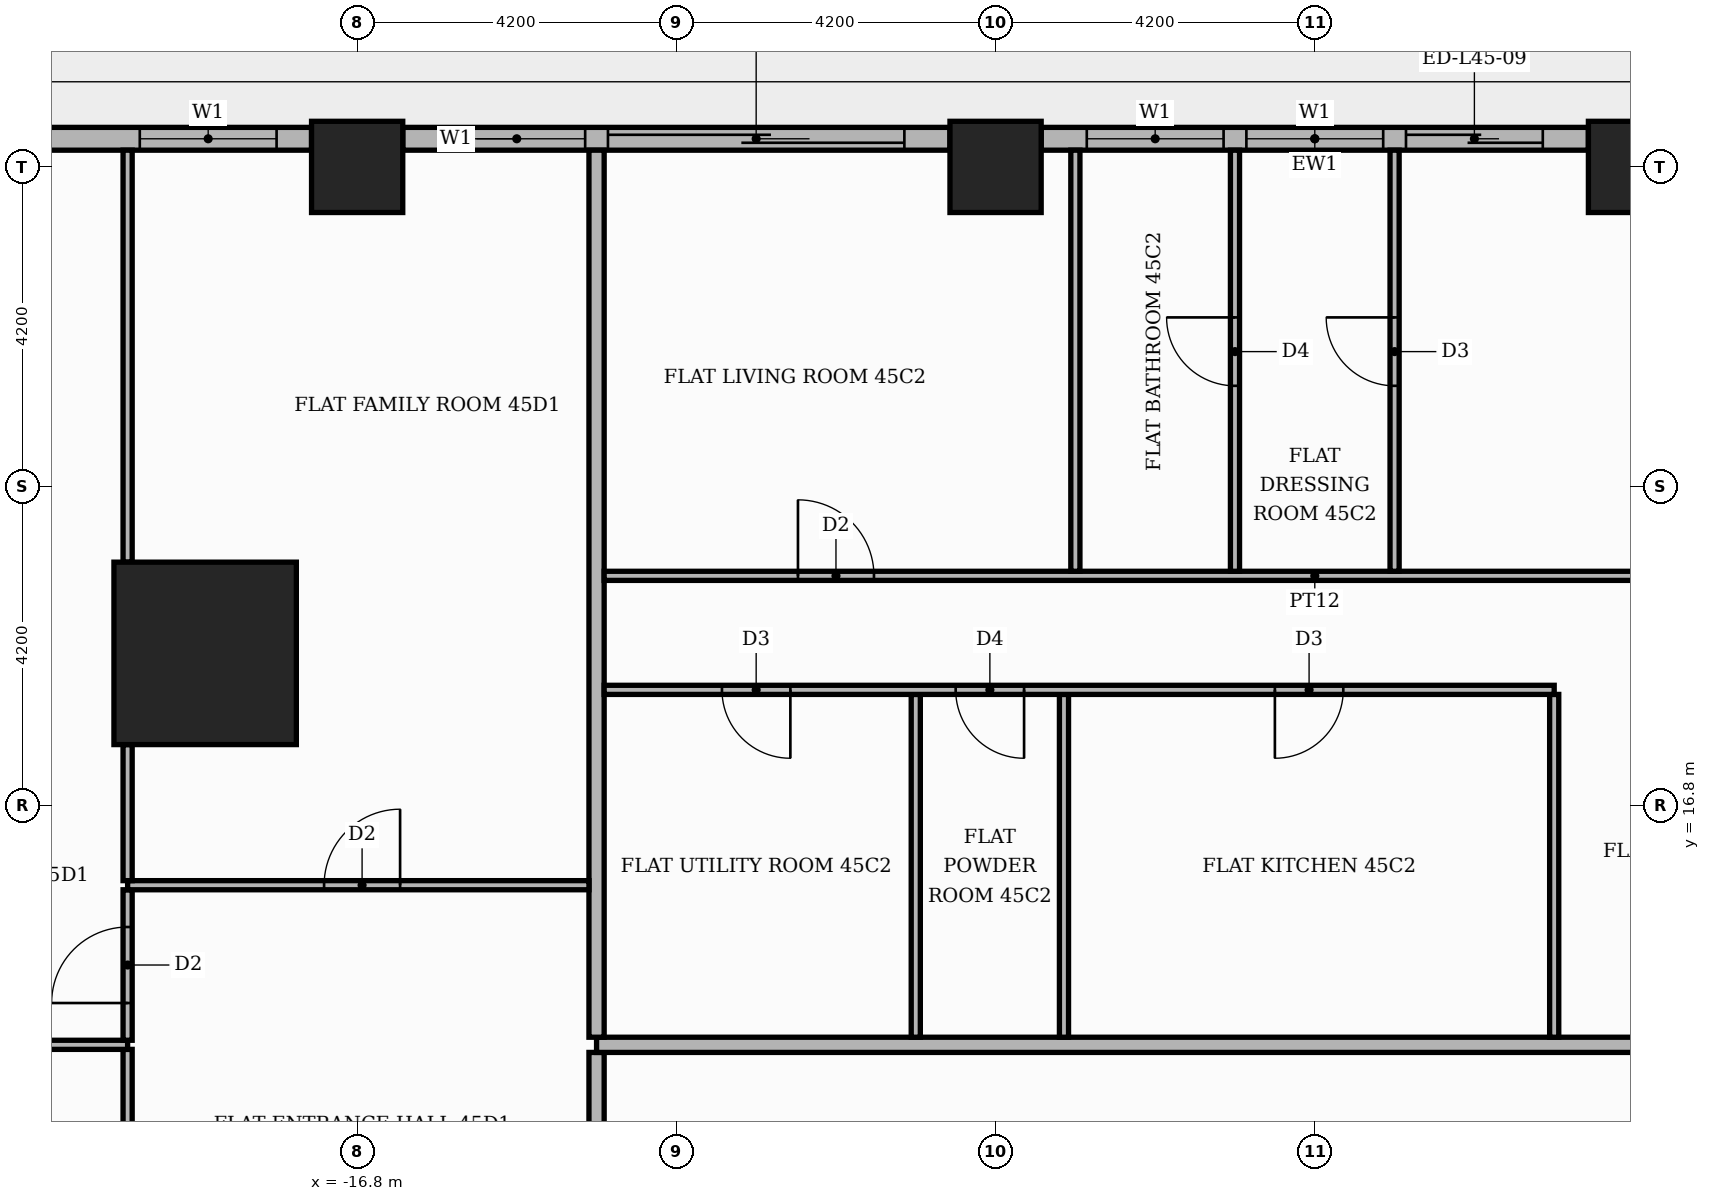
"""IFC4 building model, lengths in metres.
Left out: names, types, materials, properties, quantities, classifications, styles, units other than length and angle.
Written with IfcOpenShell. Run it as: python <this file> out.ifc"""

import sys

from ifc_helpers import new_model, si_unit, direction, frame, frame_2d, origin, origin_2d, place, context, subcontext, project, spatial, rectangle, extrude, element, fill, save


model = new_model("IFC4")
c1 = context("Model", 3, precision=1e-05, world=origin(), true_north=direction((0.0, 1.0)))
c2 = subcontext(c1, "Body", "Model", "MODEL_VIEW")
j1 = project(units=[si_unit("LENGTHUNIT", "METRE"), si_unit("PLANEANGLEUNIT", "RADIAN")], contexts=[c1])
p1 = place(None, origin())
s1 = spatial("IfcSite", under=j1, at=p1, CompositionType="ELEMENT")
p2 = place(p1, origin())
s2 = spatial("IfcBuilding", under=s1, at=p2, CompositionType="ELEMENT")
p3 = place(p2, frame((0.0, 0.0, 192.3)))
s3 = spatial("IfcBuildingStorey", under=s2, at=p3, CompositionType="ELEMENT", Elevation=192.3)
p4 = place(p3, frame((-18.8, 18.8, 0.0), z_axis=(0.0, 0.0, 1.0), x_axis=(1.0, 0.0, 0.0)))
e1 = element("IfcColumn", 1, at=p4, inside=s3, PredefinedType="COLUMN", context=c2, shape_type="SweptSolid", body=[
    extrude(rectangle(XDim=2.4, YDim=2.4, at=origin_2d()), origin(), (0.0, 0.0, 1.0), 3.9),
])
for number, where, z_axis, x_axis in (
    (2, (0.0, 25.2, 0.0), (0.0, 0.0, 1.0), (1.0, 0.0, 0.0)),
    (3, (-8.4, 25.2, 0.0), (0.0, 0.0, 1.0), (1.0, 0.0, 0.0)),
    (4, (-16.8, 25.2, 0.0), (0.0, 0.0, 1.0), (1.0, 0.0, 0.0)),
):
    element("IfcColumn", number, at=place(p3, frame(where, z_axis=z_axis, x_axis=x_axis)), inside=s3, PredefinedType="COLUMN", context=c2, shape_type="SweptSolid", body=[
        extrude(rectangle(XDim=1.2, YDim=1.2, at=origin_2d()), origin(), (0.0, 0.0, 1.0), 3.9),
    ])
p5 = place(p3, frame((-0.6, 25.57, 0.0), z_axis=(0.0, 0.0, 1.0), x_axis=(-1.0, 0.0, 0.0)))
e5 = element("IfcWall", 5, at=p5, inside=s3, PredefinedType="STANDARD", context=c2, shape_type="SweptSolid", body=[
    extrude(rectangle(XDim=7.2, YDim=0.3, at=frame_2d((3.6, 0.0))), origin(), (0.0, 0.0, 1.0), 3.48),
])
p6 = place(p5, frame((0.6, 0.0, 0.0)))
e6 = element("IfcOpeningElement", 6, at=p6, cuts=e5, PredefinedType="OPENING", context=c2, shape_type="SweptSolid", body=[
    extrude(rectangle(XDim=1.8, YDim=2.4, at=frame_2d((0.9, 1.2))), frame((0.0, 0.16, 0.0), z_axis=(0.0, -1.0, 0.0), x_axis=(1.0, 0.0, 0.0)), (0.0, 0.0, 1.0), 0.32),
])
p7 = place(p5, frame((2.7, 0.0, 0.9)))
e7 = element("IfcOpeningElement", 7, at=p7, cuts=e5, PredefinedType="OPENING", context=c2, shape_type="SweptSolid", body=[
    extrude(rectangle(XDim=1.8, YDim=2.1, at=frame_2d((0.9, 1.05))), frame((0.0, 0.16, 0.0), z_axis=(0.0, -1.0, 0.0), x_axis=(1.0, 0.0, 0.0)), (0.0, 0.0, 1.0), 0.32),
])
p8 = place(p5, frame((4.8, 0.0, 0.9)))
e8 = element("IfcOpeningElement", 8, at=p8, cuts=e5, PredefinedType="OPENING", context=c2, shape_type="SweptSolid", body=[
    extrude(rectangle(XDim=1.8, YDim=2.1, at=frame_2d((0.9, 1.05))), frame((0.0, 0.16, 0.0), z_axis=(0.0, -1.0, 0.0), x_axis=(1.0, 0.0, 0.0)), (0.0, 0.0, 1.0), 0.32),
])
p9 = place(p3, frame((-9.0, 25.57, 0.0), z_axis=(0.0, 0.0, 1.0), x_axis=(-1.0, 0.0, 0.0)))
e9 = element("IfcWall", 9, at=p9, inside=s3, PredefinedType="STANDARD", context=c2, shape_type="SweptSolid", body=[
    extrude(rectangle(XDim=7.2, YDim=0.3, at=frame_2d((3.6, 0.0))), origin(), (0.0, 0.0, 1.0), 3.48),
])
p10 = place(p9, frame((0.6, 0.0, 0.0)))
e10 = element("IfcOpeningElement", 10, at=p10, cuts=e9, PredefinedType="OPENING", context=c2, shape_type="SweptSolid", body=[
    extrude(rectangle(XDim=3.9, YDim=2.4, at=frame_2d((1.95, 1.2))), frame((0.0, 0.16, 0.0), z_axis=(0.0, -1.0, 0.0), x_axis=(1.0, 0.0, 0.0)), (0.0, 0.0, 1.0), 0.32),
])
p11 = place(p9, frame((4.8, 0.0, 0.9)))
e11 = element("IfcOpeningElement", 11, at=p11, cuts=e9, PredefinedType="OPENING", context=c2, shape_type="SweptSolid", body=[
    extrude(rectangle(XDim=1.8, YDim=2.1, at=frame_2d((0.9, 1.05))), frame((0.0, 0.16, 0.0), z_axis=(0.0, -1.0, 0.0), x_axis=(1.0, 0.0, 0.0)), (0.0, 0.0, 1.0), 0.32),
])
p12 = place(p3, frame((-17.4, 25.57, 0.0), z_axis=(0.0, 0.0, 1.0), x_axis=(-1.0, 0.0, 0.0)))
e12 = element("IfcWall", 12, at=p12, inside=s3, PredefinedType="STANDARD", context=c2, shape_type="SweptSolid", body=[
    extrude(rectangle(XDim=3.82, YDim=0.3, at=frame_2d((1.91, 0.0))), origin(), (0.0, 0.0, 1.0), 3.48),
])
p13 = place(p12, frame((0.46, 0.0, 0.9)))
e13 = element("IfcOpeningElement", 13, at=p13, cuts=e12, PredefinedType="OPENING", context=c2, shape_type="SweptSolid", body=[
    extrude(rectangle(XDim=1.8, YDim=2.1, at=frame_2d((0.9, 1.05))), frame((0.0, 0.16, 0.0), z_axis=(0.0, -1.0, 0.0), x_axis=(1.0, 0.0, 0.0)), (0.0, 0.0, 1.0), 0.32),
])
p14 = place(p3, frame((-13.65, 5.35, 0.0), z_axis=(0.0, 0.0, 1.0), x_axis=(0.0, 1.0, 0.0)))
e14 = element("IfcWall", 14, at=p14, inside=s3, PredefinedType="PARTITIONING", context=c2, shape_type="SweptSolid", body=[
    extrude(rectangle(XDim=8.2, YDim=0.2, at=frame_2d((4.1, 0.0))), origin(), (0.0, 0.0, 1.0), 3.48),
])
p15 = place(p14, frame((5.65, 0.0, 0.0)))
e15 = element("IfcOpeningElement", 15, at=p15, cuts=e14, PredefinedType="OPENING", context=c2, shape_type="SweptSolid", body=[
    extrude(rectangle(XDim=1.1, YDim=2.4, at=frame_2d((0.55, 1.2))), frame((0.0, 0.11, 0.0), z_axis=(0.0, -1.0, 0.0), x_axis=(1.0, 0.0, 0.0)), (0.0, 0.0, 1.0), 0.22),
])
p16 = place(p3, frame((-19.82, 9.51, 0.0), z_axis=(0.0, 0.0, 1.0), x_axis=(0.0, 1.0, 0.0)))
e16 = element("IfcWall", 16, at=p16, inside=s3, PredefinedType="PARTITIONING", context=c2, shape_type="SweptSolid", body=[
    extrude(rectangle(XDim=4.08, YDim=0.12, at=frame_2d((2.04, 0.0))), origin(), (0.0, 0.0, 1.0), 3.48),
])
p17 = place(p16, frame((1.59, 0.0, 0.0)))
e17 = element("IfcOpeningElement", 17, at=p17, cuts=e16, PredefinedType="OPENING", context=c2, shape_type="SweptSolid", body=[
    extrude(rectangle(XDim=0.9, YDim=2.1, at=frame_2d((0.45, 1.05))), frame((0.0, 0.07, 0.0), z_axis=(0.0, -1.0, 0.0), x_axis=(1.0, 0.0, 0.0)), (0.0, 0.0, 1.0), 0.14),
])
p18 = place(p3, frame((-25.42, 13.65, 0.0), z_axis=(0.0, 0.0, 1.0), x_axis=(1.0, 0.0, 0.0)))
e18 = element("IfcWall", 18, at=p18, inside=s3, PredefinedType="PARTITIONING", context=c2, shape_type="SweptSolid", body=[
    extrude(rectangle(XDim=5.6, YDim=0.12, at=frame_2d((2.8, 0.0))), origin(), (0.0, 0.0, 1.0), 3.48),
])
p19 = place(p3, frame((-13.65, 13.65, 0.0), z_axis=(0.0, 0.0, 1.0), x_axis=(1.0, 0.0, 0.0)))
e19 = element("IfcWall", 19, at=p19, inside=s3, PredefinedType="PARTITIONING", context=c2, shape_type="SweptSolid", body=[
    extrude(rectangle(XDim=39.07, YDim=0.2, at=frame_2d((19.535, 0.0))), origin(), (0.0, 0.0, 1.0), 3.48),
])
p20 = place(p19, frame((24.65, 0.0, 0.0)))
e20 = element("IfcOpeningElement", 20, at=p20, cuts=e19, PredefinedType="OPENING", context=c2, shape_type="SweptSolid", body=[
    extrude(rectangle(XDim=1.1, YDim=2.4, at=frame_2d((0.55, 1.2))), frame((0.0, 0.11, 0.0), z_axis=(0.0, -1.0, 0.0), x_axis=(1.0, 0.0, 0.0)), (0.0, 0.0, 1.0), 0.22),
])
p21 = place(p19, frame((14.15, 0.0, 0.0)))
e21 = element("IfcOpeningElement", 21, at=p21, cuts=e19, PredefinedType="OPENING", context=c2, shape_type="SweptSolid", body=[
    extrude(rectangle(XDim=1.1, YDim=2.4, at=frame_2d((0.55, 1.2))), frame((0.0, 0.11, 0.0), z_axis=(0.0, -1.0, 0.0), x_axis=(1.0, 0.0, 0.0)), (0.0, 0.0, 1.0), 0.22),
])
p22 = place(p3, frame((-19.82, 13.71, 0.0), z_axis=(0.0, 0.0, 1.0), x_axis=(0.0, 1.0, 0.0)))
e22 = element("IfcWall", 22, at=p22, inside=s3, PredefinedType="PARTITIONING", context=c2, shape_type="SweptSolid", body=[
    extrude(rectangle(XDim=1.98, YDim=0.12, at=frame_2d((0.99, 0.0))), origin(), (0.0, 0.0, 1.0), 3.48),
])
p23 = place(p22, frame((0.49, 0.0, 0.0)))
e23 = element("IfcOpeningElement", 23, at=p23, cuts=e22, PredefinedType="OPENING", context=c2, shape_type="SweptSolid", body=[
    extrude(rectangle(XDim=1.0, YDim=2.1, at=frame_2d((0.5, 1.05))), frame((0.0, 0.07, 0.0), z_axis=(0.0, -1.0, 0.0), x_axis=(1.0, 0.0, 0.0)), (0.0, 0.0, 1.0), 0.14),
])
p24 = place(p3, frame((-13.65, 13.75, 0.0), z_axis=(0.0, 0.0, 1.0), x_axis=(0.0, 1.0, 0.0)))
e24 = element("IfcWall", 24, at=p24, inside=s3, PredefinedType="PARTITIONING", context=c2, shape_type="SweptSolid", body=[
    extrude(rectangle(XDim=11.67, YDim=0.2, at=frame_2d((5.835, 0.0))), origin(), (0.0, 0.0, 1.0), 3.48),
])
for number, where, z_axis, x_axis in (
    (25, (-9.45, 13.75, 0.0), (0.0, 0.0, 1.0), (0.0, 1.0, 0.0)),
    (26, (-7.5, 13.75, 0.0), (0.0, 0.0, 1.0), (0.0, 1.0, 0.0)),
    (27, (-1.05, 13.75, 0.0), (0.0, 0.0, 1.0), (0.0, 1.0, 0.0)),
):
    element("IfcWall", number, at=place(p3, frame(where, z_axis=z_axis, x_axis=x_axis)), inside=s3, PredefinedType="PARTITIONING", context=c2, shape_type="SweptSolid", body=[
        extrude(rectangle(XDim=4.51, YDim=0.12, at=frame_2d((2.255, 0.0))), origin(), (0.0, 0.0, 1.0), 3.48),
    ])
p25 = place(p3, frame((-19.82, 15.75, 0.0), z_axis=(0.0, 0.0, 1.0), x_axis=(1.0, 0.0, 0.0)))
e28 = element("IfcWall", 28, at=p25, inside=s3, PredefinedType="PARTITIONING", context=c2, shape_type="SweptSolid", body=[
    extrude(rectangle(XDim=6.07, YDim=0.12, at=frame_2d((3.035, 0.0))), origin(), (0.0, 0.0, 1.0), 3.48),
])
p26 = place(p25, frame((2.585, 0.0, 0.0)))
e29 = element("IfcOpeningElement", 29, at=p26, cuts=e28, PredefinedType="OPENING", context=c2, shape_type="SweptSolid", body=[
    extrude(rectangle(XDim=1.0, YDim=2.1, at=frame_2d((0.5, 1.05))), frame((0.0, 0.07, 0.0), z_axis=(0.0, -1.0, 0.0), x_axis=(1.0, 0.0, 0.0)), (0.0, 0.0, 1.0), 0.14),
])
p27 = place(p3, frame((-19.82, 15.81, 0.0), z_axis=(0.0, 0.0, 1.0), x_axis=(0.0, 1.0, 0.0)))
e30 = element("IfcWall", 30, at=p27, inside=s3, PredefinedType="PARTITIONING", context=c2, shape_type="SweptSolid", body=[
    extrude(rectangle(XDim=1.79, YDim=0.12, at=frame_2d((0.895, 0.0))), origin(), (0.0, 0.0, 1.0), 3.48),
])
p28 = place(p3, frame((-13.55, 18.32, 0.0), z_axis=(0.0, 0.0, 1.0), x_axis=(1.0, 0.0, 0.0)))
e31 = element("IfcWall", 31, at=p28, inside=s3, PredefinedType="PARTITIONING", context=c2, shape_type="SweptSolid", body=[
    extrude(rectangle(XDim=12.5, YDim=0.12, at=frame_2d((6.25, 0.0))), origin(), (0.0, 0.0, 1.0), 3.48),
])
p29 = place(p28, frame((8.825, 0.0, 0.0)))
e32 = element("IfcOpeningElement", 32, at=p29, cuts=e31, PredefinedType="OPENING", context=c2, shape_type="SweptSolid", body=[
    extrude(rectangle(XDim=0.9, YDim=2.1, at=frame_2d((0.45, 1.05))), frame((0.0, 0.07, 0.0), z_axis=(0.0, -1.0, 0.0), x_axis=(1.0, 0.0, 0.0)), (0.0, 0.0, 1.0), 0.14),
])
p30 = place(p28, frame((4.625, 0.0, 0.0)))
e33 = element("IfcOpeningElement", 33, at=p30, cuts=e31, PredefinedType="OPENING", context=c2, shape_type="SweptSolid", body=[
    extrude(rectangle(XDim=0.9, YDim=2.1, at=frame_2d((0.45, 1.05))), frame((0.0, 0.07, 0.0), z_axis=(0.0, -1.0, 0.0), x_axis=(1.0, 0.0, 0.0)), (0.0, 0.0, 1.0), 0.14),
])
p31 = place(p28, frame((1.55, 0.0, 0.0)))
e34 = element("IfcOpeningElement", 34, at=p31, cuts=e31, PredefinedType="OPENING", context=c2, shape_type="SweptSolid", body=[
    extrude(rectangle(XDim=0.9, YDim=2.1, at=frame_2d((0.45, 1.05))), frame((0.0, 0.07, 0.0), z_axis=(0.0, -1.0, 0.0), x_axis=(1.0, 0.0, 0.0)), (0.0, 0.0, 1.0), 0.14),
])
p32 = place(p3, frame((-13.55, 19.82, 0.0), z_axis=(0.0, 0.0, 1.0), x_axis=(1.0, 0.0, 0.0)))
e35 = element("IfcWall", 35, at=p32, inside=s3, PredefinedType="PARTITIONING", context=c2, shape_type="SweptSolid", body=[
    extrude(rectangle(XDim=18.7, YDim=0.12, at=frame_2d((9.35, 0.0))), origin(), (0.0, 0.0, 1.0), 3.48),
])
p33 = place(p32, frame((14.15, 0.0, 0.0)))
e36 = element("IfcOpeningElement", 36, at=p33, cuts=e35, PredefinedType="OPENING", context=c2, shape_type="SweptSolid", body=[
    extrude(rectangle(XDim=0.9, YDim=2.1, at=frame_2d((0.45, 1.05))), frame((0.0, 0.07, 0.0), z_axis=(0.0, -1.0, 0.0), x_axis=(1.0, 0.0, 0.0)), (0.0, 0.0, 1.0), 0.14),
])
p34 = place(p32, frame((2.55, 0.0, 0.0)))
e37 = element("IfcOpeningElement", 37, at=p34, cuts=e35, PredefinedType="OPENING", context=c2, shape_type="SweptSolid", body=[
    extrude(rectangle(XDim=1.0, YDim=2.1, at=frame_2d((0.5, 1.05))), frame((0.0, 0.07, 0.0), z_axis=(0.0, -1.0, 0.0), x_axis=(1.0, 0.0, 0.0)), (0.0, 0.0, 1.0), 0.14),
])
p35 = place(p3, frame((-7.35, 19.88, 0.0), z_axis=(0.0, 0.0, 1.0), x_axis=(0.0, 1.0, 0.0)))
e38 = element("IfcWall", 38, at=p35, inside=s3, PredefinedType="PARTITIONING", context=c2, shape_type="SweptSolid", body=[
    extrude(rectangle(XDim=5.54, YDim=0.12, at=frame_2d((2.77, 0.0))), origin(), (0.0, 0.0, 1.0), 3.48),
])
p36 = place(p3, frame((-5.25, 19.88, 0.0), z_axis=(0.0, 0.0, 1.0), x_axis=(0.0, 1.0, 0.0)))
e39 = element("IfcWall", 39, at=p36, inside=s3, PredefinedType="PARTITIONING", context=c2, shape_type="SweptSolid", body=[
    extrude(rectangle(XDim=5.54, YDim=0.12, at=frame_2d((2.77, 0.0))), origin(), (0.0, 0.0, 1.0), 3.48),
])
p37 = place(p36, frame((2.44, 0.0, 0.0)))
e40 = element("IfcOpeningElement", 40, at=p37, cuts=e39, PredefinedType="OPENING", context=c2, shape_type="SweptSolid", body=[
    extrude(rectangle(XDim=0.9, YDim=2.1, at=frame_2d((0.45, 1.05))), frame((0.0, 0.07, 0.0), z_axis=(0.0, -1.0, 0.0), x_axis=(1.0, 0.0, 0.0)), (0.0, 0.0, 1.0), 0.14),
])
p38 = place(p3, frame((-3.15, 19.88, 0.0), z_axis=(0.0, 0.0, 1.0), x_axis=(0.0, 1.0, 0.0)))
e41 = element("IfcWall", 41, at=p38, inside=s3, PredefinedType="PARTITIONING", context=c2, shape_type="SweptSolid", body=[
    extrude(rectangle(XDim=5.54, YDim=0.12, at=frame_2d((2.77, 0.0))), origin(), (0.0, 0.0, 1.0), 3.48),
])
p39 = place(p38, frame((2.44, 0.0, 0.0)))
e42 = element("IfcOpeningElement", 42, at=p39, cuts=e41, PredefinedType="OPENING", context=c2, shape_type="SweptSolid", body=[
    extrude(rectangle(XDim=0.9, YDim=2.1, at=frame_2d((0.45, 1.05))), frame((0.0, 0.07, 0.0), z_axis=(0.0, -1.0, 0.0), x_axis=(1.0, 0.0, 0.0)), (0.0, 0.0, 1.0), 0.14),
])
p40 = place(p3, frame((-19.82, 20.0, 0.0), z_axis=(0.0, 0.0, 1.0), x_axis=(0.0, 1.0, 0.0)))
e43 = element("IfcWall", 43, at=p40, inside=s3, PredefinedType="PARTITIONING", context=c2, shape_type="SweptSolid", body=[
    extrude(rectangle(XDim=5.42, YDim=0.12, at=frame_2d((2.71, 0.0))), origin(), (0.0, 0.0, 1.0), 3.48),
])
p41 = place(p6, origin())
e44 = element("IfcDoor", 44, at=p41, inside=s3, OperationType="SLIDING_TO_LEFT", PredefinedType="DOOR", context=c2, shape_type="SweptSolid", body=[
    extrude(rectangle(XDim=1.8, YDim=2.4, at=frame_2d((0.9, 1.2))), frame((0.0, 0.025, 0.0), z_axis=(0.0, -1.0, 0.0), x_axis=(1.0, 0.0, 0.0)), (0.0, 0.0, 1.0), 0.05),
])
fill(e6, e44)
p42 = place(p7, origin())
e45 = element("IfcWindow", 45, at=p42, inside=s3, PartitioningType="SINGLE_PANEL", PredefinedType="WINDOW", context=c2, shape_type="SweptSolid", body=[
    extrude(rectangle(XDim=1.8, YDim=2.1, at=frame_2d((0.9, 1.05))), frame((0.0, 0.03, 0.0), z_axis=(0.0, -1.0, 0.0), x_axis=(1.0, 0.0, 0.0)), (0.0, 0.0, 1.0), 0.06),
])
fill(e7, e45)
p43 = place(p8, origin())
e46 = element("IfcWindow", 46, at=p43, inside=s3, PartitioningType="SINGLE_PANEL", PredefinedType="WINDOW", context=c2, shape_type="SweptSolid", body=[
    extrude(rectangle(XDim=1.8, YDim=2.1, at=frame_2d((0.9, 1.05))), frame((0.0, 0.03, 0.0), z_axis=(0.0, -1.0, 0.0), x_axis=(1.0, 0.0, 0.0)), (0.0, 0.0, 1.0), 0.06),
])
fill(e8, e46)
p44 = place(p10, origin())
e47 = element("IfcDoor", 47, at=p44, inside=s3, OperationType="SLIDING_TO_LEFT", PredefinedType="DOOR", context=c2, shape_type="SweptSolid", body=[
    extrude(rectangle(XDim=3.9, YDim=2.4, at=frame_2d((1.95, 1.2))), frame((0.0, 0.025, 0.0), z_axis=(0.0, -1.0, 0.0), x_axis=(1.0, 0.0, 0.0)), (0.0, 0.0, 1.0), 0.05),
])
fill(e10, e47)
p45 = place(p11, origin())
e48 = element("IfcWindow", 48, at=p45, inside=s3, PartitioningType="SINGLE_PANEL", PredefinedType="WINDOW", context=c2, shape_type="SweptSolid", body=[
    extrude(rectangle(XDim=1.8, YDim=2.1, at=frame_2d((0.9, 1.05))), frame((0.0, 0.03, 0.0), z_axis=(0.0, -1.0, 0.0), x_axis=(1.0, 0.0, 0.0)), (0.0, 0.0, 1.0), 0.06),
])
fill(e11, e48)
p46 = place(p13, origin())
e49 = element("IfcWindow", 49, at=p46, inside=s3, PartitioningType="SINGLE_PANEL", PredefinedType="WINDOW", context=c2, shape_type="SweptSolid", body=[
    extrude(rectangle(XDim=1.8, YDim=2.1, at=frame_2d((0.9, 1.05))), frame((0.0, 0.03, 0.0), z_axis=(0.0, -1.0, 0.0), x_axis=(1.0, 0.0, 0.0)), (0.0, 0.0, 1.0), 0.06),
])
fill(e13, e49)
p47 = place(p29, frame((0.9, 0.0, 0.0), z_axis=(0.0, 0.0, 1.0), x_axis=(-1.0, 0.0, 0.0)))
e50 = element("IfcDoor", 50, at=p47, inside=s3, OperationType="SINGLE_SWING_LEFT", PredefinedType="DOOR", context=c2, shape_type="SweptSolid", body=[
    extrude(rectangle(XDim=0.9, YDim=2.1, at=frame_2d((0.45, 1.05))), frame((0.0, 0.025, 0.0), z_axis=(0.0, -1.0, 0.0), x_axis=(1.0, 0.0, 0.0)), (0.0, 0.0, 1.0), 0.05),
])
fill(e32, e50)
p48 = place(p30, frame((0.9, 0.0, 0.0), z_axis=(0.0, 0.0, 1.0), x_axis=(-1.0, 0.0, 0.0)))
e51 = element("IfcDoor", 51, at=p48, inside=s3, OperationType="SINGLE_SWING_RIGHT", PredefinedType="DOOR", context=c2, shape_type="SweptSolid", body=[
    extrude(rectangle(XDim=0.9, YDim=2.1, at=frame_2d((0.45, 1.05))), frame((0.0, 0.025, 0.0), z_axis=(0.0, -1.0, 0.0), x_axis=(1.0, 0.0, 0.0)), (0.0, 0.0, 1.0), 0.05),
])
fill(e33, e51)
p49 = place(p31, frame((0.9, 0.0, 0.0), z_axis=(0.0, 0.0, 1.0), x_axis=(-1.0, 0.0, 0.0)))
e52 = element("IfcDoor", 52, at=p49, inside=s3, OperationType="SINGLE_SWING_RIGHT", PredefinedType="DOOR", context=c2, shape_type="SweptSolid", body=[
    extrude(rectangle(XDim=0.9, YDim=2.1, at=frame_2d((0.45, 1.05))), frame((0.0, 0.025, 0.0), z_axis=(0.0, -1.0, 0.0), x_axis=(1.0, 0.0, 0.0)), (0.0, 0.0, 1.0), 0.05),
])
fill(e34, e52)
p50 = place(p39, origin())
e53 = element("IfcDoor", 53, at=p50, inside=s3, OperationType="SINGLE_SWING_RIGHT", PredefinedType="DOOR", context=c2, shape_type="SweptSolid", body=[
    extrude(rectangle(XDim=0.9, YDim=2.1, at=frame_2d((0.45, 1.05))), frame((0.0, 0.025, 0.0), z_axis=(0.0, -1.0, 0.0), x_axis=(1.0, 0.0, 0.0)), (0.0, 0.0, 1.0), 0.05),
])
fill(e42, e53)
p51 = place(p37, origin())
e54 = element("IfcDoor", 54, at=p51, inside=s3, OperationType="SINGLE_SWING_RIGHT", PredefinedType="DOOR", context=c2, shape_type="SweptSolid", body=[
    extrude(rectangle(XDim=0.9, YDim=2.1, at=frame_2d((0.45, 1.05))), frame((0.0, 0.025, 0.0), z_axis=(0.0, -1.0, 0.0), x_axis=(1.0, 0.0, 0.0)), (0.0, 0.0, 1.0), 0.05),
])
fill(e40, e54)
p52 = place(p34, origin())
e55 = element("IfcDoor", 55, at=p52, inside=s3, OperationType="SINGLE_SWING_LEFT", PredefinedType="DOOR", context=c2, shape_type="SweptSolid", body=[
    extrude(rectangle(XDim=1.0, YDim=2.1, at=frame_2d((0.5, 1.05))), frame((0.0, 0.025, 0.0), z_axis=(0.0, -1.0, 0.0), x_axis=(1.0, 0.0, 0.0)), (0.0, 0.0, 1.0), 0.05),
])
fill(e37, e55)
p53 = place(p26, origin())
e56 = element("IfcDoor", 56, at=p53, inside=s3, OperationType="SINGLE_SWING_RIGHT", PredefinedType="DOOR", context=c2, shape_type="SweptSolid", body=[
    extrude(rectangle(XDim=1.0, YDim=2.1, at=frame_2d((0.5, 1.05))), frame((0.0, 0.025, 0.0), z_axis=(0.0, -1.0, 0.0), x_axis=(1.0, 0.0, 0.0)), (0.0, 0.0, 1.0), 0.05),
])
fill(e29, e56)
p54 = place(p23, origin())
e57 = element("IfcDoor", 57, at=p54, inside=s3, OperationType="SINGLE_SWING_LEFT", PredefinedType="DOOR", context=c2, shape_type="SweptSolid", body=[
    extrude(rectangle(XDim=1.0, YDim=2.1, at=frame_2d((0.5, 1.05))), frame((0.0, 0.025, 0.0), z_axis=(0.0, -1.0, 0.0), x_axis=(1.0, 0.0, 0.0)), (0.0, 0.0, 1.0), 0.05),
])
fill(e23, e57)
save(model, sys.argv[1])
